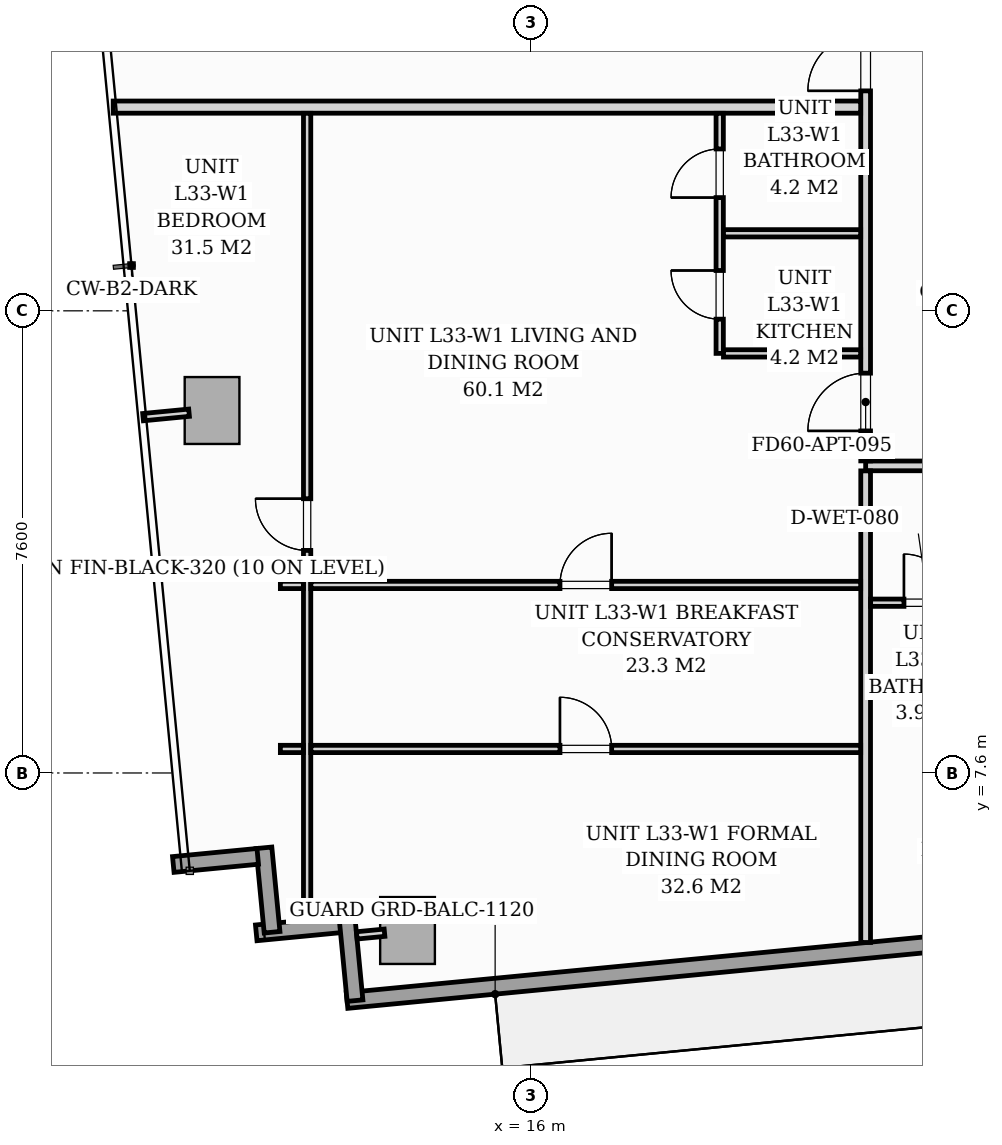
"""IFC4 building model, lengths in metres.
Left out: names, types, materials, properties, quantities, classifications, styles, units other than length and angle.
Written with IfcOpenShell. Run it as: python <this file> out.ifc"""

import sys

from ifc_helpers import new_model, si_unit, direction, frame, frame_2d, origin, origin_2d, place, context, subcontext, project, spatial, rectangle, extrude, source, transform, mapped, element, fill, save


model = new_model("IFC4")
c1 = context("Model", 3, precision=1e-05, world=origin(), true_north=direction((0.0, 1.0)))
c2 = subcontext(c1, "Body", "Model", "MODEL_VIEW")
j1 = project(units=[si_unit("LENGTHUNIT", "METRE"), si_unit("PLANEANGLEUNIT", "RADIAN")], contexts=[c1])
p1 = place(None, origin())
s1 = spatial("IfcSite", under=j1, at=p1, CompositionType="ELEMENT")
p2 = place(p1, origin())
s2 = spatial("IfcBuilding", under=s1, at=p2, CompositionType="ELEMENT")
p3 = place(p2, frame((0.0, 0.0, 116.2)))
s3 = spatial("IfcBuildingStorey", under=s2, at=p3, CompositionType="ELEMENT", Elevation=116.2)
m1 = source(origin(), c2, "Body", "SweptSolid", [
    extrude(rectangle(XDim=0.9, YDim=1.1, at=origin_2d()), origin(), (0.0, 0.0, 1.0), 3.194),
])
for number, where, z_axis, x_axis in (
    (1, (13.966, 5.01, 0.002), (0.0, 0.0, 1.0), (0.995, 0.096, 0.0)),
    (2, (10.752, 13.561, 0.002), (0.0, 0.0, 1.0), (0.995, 0.096, 0.0)),
):
    element("IfcColumn", number, at=place(p3, frame(where, z_axis=z_axis, x_axis=x_axis)), inside=s3, PredefinedType="COLUMN", context=c2, shape_type="MappedRepresentation", body=[
        mapped(m1, transform((0.0, 0.0, 0.0), scale=1.0)),
    ])
for number, where, z_axis, x_axis in (
    (3, (12.867, 5.104, 0.0), (0.0, 0.0, 1.0), (-0.995, -0.096, 0.0)),
    (4, (11.739, 4.981, 0.0), (0.0, 0.0, 1.0), (-0.096, 0.995, 0.0)),
):
    element("IfcWall", number, at=place(p3, frame(where, z_axis=z_axis, x_axis=x_axis)), inside=s3, PredefinedType="STANDARD", context=c2, shape_type="SweptSolid", body=[
        extrude(rectangle(XDim=1.395, YDim=0.26, at=frame_2d((0.697, 0.0))), origin(), (0.0, 0.0, 1.0), 2.9),
    ])
p4 = place(p3, frame((11.503, 6.229, 0.0), z_axis=(0.0, 0.0, 1.0), x_axis=(-0.995391056452, -0.09589913835, 0.0)))
e5 = element("IfcWall", 5, at=p4, inside=s3, PredefinedType="STANDARD", context=c2, shape_type="SweptSolid", body=[
    extrude(rectangle(XDim=1.395, YDim=0.26, at=frame_2d((0.698, 0.0))), origin(), (0.0, 0.0, 1.0), 2.9),
])
p5 = place(p3, frame((31.994, 5.69, 0.0), z_axis=(0.0, 0.0, 1.0), x_axis=(-0.995396521236, -0.095842399342, 0.0)))
e6 = element("IfcWall", 6, at=p5, inside=s3, PredefinedType="STANDARD", context=c2, shape_type="SweptSolid", body=[
    extrude(rectangle(XDim=19.11, YDim=0.26, at=frame_2d((9.555, 0.0))), origin(), (0.0, 0.0, 1.0), 2.9),
])
p6 = place(p5, frame((7.63, 0.0, 0.0)))
e7 = element("IfcOpeningElement", 7, at=p6, cuts=e6, PredefinedType="OPENING", context=c2, shape_type="SweptSolid", body=[
    extrude(rectangle(XDim=1.8, YDim=2.06, at=frame_2d((0.9, 1.03))), frame((0.0, 0.14, 0.0), z_axis=(0.0, -1.0, 0.0), x_axis=(1.0, 0.0, 0.0)), (0.0, 0.0, 1.0), 0.28),
])
p7 = place(p5, frame((2.5, 0.0, 0.65)))
e8 = element("IfcOpeningElement", 8, at=p7, cuts=e6, PredefinedType="OPENING", context=c2, shape_type="SweptSolid", body=[
    extrude(rectangle(XDim=1.6, YDim=1.5, at=frame_2d((0.8, 0.75))), frame((0.0, 0.14, 0.0), z_axis=(0.0, -1.0, 0.0), x_axis=(1.0, 0.0, 0.0)), (0.0, 0.0, 1.0), 0.28),
])
p8 = place(p3, frame((13.103, 3.856, 0.0), z_axis=(0.0, 0.0, 1.0), x_axis=(-0.09589913835, 0.995391056452, 0.0)))
e9 = element("IfcWall", 9, at=p8, inside=s3, PredefinedType="STANDARD", context=c2, shape_type="SweptSolid", body=[
    extrude(rectangle(XDim=1.395, YDim=0.26, at=frame_2d((0.698, 0.0))), origin(), (0.0, 0.0, 1.0), 2.9),
])
p9 = place(p3, frame((21.5, 12.65, 0.0), z_axis=(0.0, 0.0, 1.0), x_axis=(1.0, 0.0, 0.0)))
e10 = element("IfcWall", 10, at=p9, inside=s3, PredefinedType="PARTITIONING", context=c2, shape_type="SweptSolid", body=[
    extrude(rectangle(XDim=26.2, YDim=0.16, at=frame_2d((13.1, 0.0))), origin(), (0.0, 0.0, 1.0), 2.9),
])
p10 = place(p9, frame((5.927, 0.0, 0.0)))
e11 = element("IfcOpeningElement", 11, at=p10, cuts=e10, PredefinedType="OPENING", context=c2, shape_type="SweptSolid", body=[
    extrude(rectangle(XDim=0.95, YDim=2.06, at=frame_2d((0.475, 1.03))), frame((0.0, 0.09, 0.0), z_axis=(0.0, -1.0, 0.0), x_axis=(1.0, 0.0, 0.0)), (0.0, 0.0, 1.0), 0.18),
])
p11 = place(p9, frame((10.575, 0.0, 0.0)))
e12 = element("IfcOpeningElement", 12, at=p11, cuts=e10, PredefinedType="OPENING", context=c2, shape_type="SweptSolid", body=[
    extrude(rectangle(XDim=0.95, YDim=2.06, at=frame_2d((0.475, 1.03))), frame((0.0, 0.09, 0.0), z_axis=(0.0, -1.0, 0.0), x_axis=(1.0, 0.0, 0.0)), (0.0, 0.0, 1.0), 0.18),
])
p12 = place(p9, frame((19.322, 0.0, 0.0)))
e13 = element("IfcOpeningElement", 13, at=p12, cuts=e10, PredefinedType="OPENING", context=c2, shape_type="SweptSolid", body=[
    extrude(rectangle(XDim=0.95, YDim=2.06, at=frame_2d((0.475, 1.03))), frame((0.0, 0.09, 0.0), z_axis=(0.0, -1.0, 0.0), x_axis=(1.0, 0.0, 0.0)), (0.0, 0.0, 1.0), 0.18),
])
p13 = place(p3, frame((21.5, 4.812, 0.0), z_axis=(0.0, 0.0, 1.0), x_axis=(0.0, 1.0, 0.0)))
e14 = element("IfcWall", 14, at=p13, inside=s3, PredefinedType="PARTITIONING", context=c2, shape_type="SweptSolid", body=[
    extrude(rectangle(XDim=7.756, YDim=0.16, at=frame_2d((3.878, 0.0))), origin(), (0.0, 0.0, 1.0), 2.9),
])
p14 = place(p3, frame((21.5, 12.732, 0.0), z_axis=(0.0, 0.0, 1.0), x_axis=(0.0, 1.0, 0.0)))
e15 = element("IfcWall", 15, at=p14, inside=s3, PredefinedType="PARTITIONING", context=c2, shape_type="SweptSolid", body=[
    extrude(rectangle(XDim=11.647, YDim=0.16, at=frame_2d((5.823, 0.0))), origin(), (0.0, 0.0, 1.0), 2.9),
])
p15 = place(p14, frame((0.493, 0.0, 0.0)))
e16 = element("IfcOpeningElement", 16, at=p15, cuts=e15, PredefinedType="OPENING", context=c2, shape_type="SweptSolid", body=[
    extrude(rectangle(XDim=0.95, YDim=2.06, at=frame_2d((0.475, 1.03))), frame((0.0, 0.09, 0.0), z_axis=(0.0, -1.0, 0.0), x_axis=(1.0, 0.0, 0.0)), (0.0, 0.0, 1.0), 0.18),
])
p16 = place(p14, frame((6.085, 0.0, 0.0)))
e17 = element("IfcOpeningElement", 17, at=p16, cuts=e15, PredefinedType="OPENING", context=c2, shape_type="SweptSolid", body=[
    extrude(rectangle(XDim=0.95, YDim=2.06, at=frame_2d((0.475, 1.03))), frame((0.0, 0.09, 0.0), z_axis=(0.0, -1.0, 0.0), x_axis=(1.0, 0.0, 0.0)), (0.0, 0.0, 1.0), 0.18),
])
p17 = place(p3, frame((21.582, 10.4, 0.0), z_axis=(0.0, 0.0, 1.0), x_axis=(1.0, 0.0, 0.0)))
e18 = element("IfcWall", 18, at=p17, inside=s3, PredefinedType="PARTITIONING", context=c2, shape_type="SweptSolid", body=[
    extrude(rectangle(XDim=4.098, YDim=0.12, at=frame_2d((2.049, 0.0))), origin(), (0.0, 0.0, 1.0), 2.9),
])
p18 = place(p17, frame((0.548, 0.0, 0.0)))
e19 = element("IfcOpeningElement", 19, at=p18, cuts=e18, PredefinedType="OPENING", context=c2, shape_type="SweptSolid", body=[
    extrude(rectangle(XDim=0.8, YDim=2.02, at=frame_2d((0.4, 1.01))), frame((0.0, 0.07, 0.0), z_axis=(0.0, -1.0, 0.0), x_axis=(1.0, 0.0, 0.0)), (0.0, 0.0, 1.0), 0.14),
])
p19 = place(p17, frame((2.573, 0.0, 0.0)))
e20 = element("IfcOpeningElement", 20, at=p19, cuts=e18, PredefinedType="OPENING", context=c2, shape_type="SweptSolid", body=[
    extrude(rectangle(XDim=0.8, YDim=2.0, at=frame_2d((0.4, 1.0))), frame((0.0, 0.07, 0.0), z_axis=(0.0, -1.0, 0.0), x_axis=(1.0, 0.0, 0.0)), (0.0, 0.0, 1.0), 0.14),
])
p20 = place(p3, frame((9.126, 18.55, 0.0), z_axis=(0.0, 0.0, 1.0), x_axis=(1.0, 0.0, 0.0)))
e21 = element("IfcWall", 21, at=p20, inside=s3, PredefinedType="PARTITIONING", context=c2, shape_type="SweptSolid", body=[
    extrude(rectangle(XDim=12.292, YDim=0.2, at=frame_2d((6.146, 0.0))), origin(), (0.0, 0.0, 1.0), 2.9),
])
p21 = place(p3, frame((19.1, 14.5, 0.0), z_axis=(0.0, 0.0, 1.0), x_axis=(0.0, 1.0, 0.0)))
e22 = element("IfcWall", 22, at=p21, inside=s3, PredefinedType="PARTITIONING", context=c2, shape_type="SweptSolid", body=[
    extrude(rectangle(XDim=3.948, YDim=0.12, at=frame_2d((1.974, 0.0))), origin(), (0.0, 0.0, 1.0), 2.9),
])
p22 = place(p21, frame((0.563, 0.0, 0.0)))
e23 = element("IfcOpeningElement", 23, at=p22, cuts=e22, PredefinedType="OPENING", context=c2, shape_type="SweptSolid", body=[
    extrude(rectangle(XDim=0.8, YDim=2.0, at=frame_2d((0.4, 1.0))), frame((0.0, 0.07, 0.0), z_axis=(0.0, -1.0, 0.0), x_axis=(1.0, 0.0, 0.0)), (0.0, 0.0, 1.0), 0.14),
])
p23 = place(p21, frame((2.562, 0.0, 0.0)))
e24 = element("IfcOpeningElement", 24, at=p23, cuts=e22, PredefinedType="OPENING", context=c2, shape_type="SweptSolid", body=[
    extrude(rectangle(XDim=0.8, YDim=2.02, at=frame_2d((0.4, 1.01))), frame((0.0, 0.07, 0.0), z_axis=(0.0, -1.0, 0.0), x_axis=(1.0, 0.0, 0.0)), (0.0, 0.0, 1.0), 0.14),
])
for number, where, z_axis, x_axis in (
    (25, (19.162, 16.475, 0.0), (0.0, 0.0, 1.0), (1.0, 0.0, 0.0)),
    (26, (19.162, 14.5, 0.0), (0.0, 0.0, 1.0), (1.0, 0.0, 0.0)),
):
    element("IfcWall", number, at=place(p3, frame(where, z_axis=z_axis, x_axis=x_axis)), inside=s3, PredefinedType="PARTITIONING", context=c2, shape_type="SweptSolid", body=[
        extrude(rectangle(XDim=2.256, YDim=0.12, at=frame_2d((1.128, 0.0))), origin(), (0.0, 0.0, 1.0), 2.9),
    ])
p24 = place(p3, frame((12.315, 5.184, 0.0), z_axis=(0.0, 0.0, 1.0), x_axis=(0.0, 1.0, 0.0)))
e27 = element("IfcWall", 27, at=p24, inside=s3, PredefinedType="PARTITIONING", context=c2, shape_type="SweptSolid", body=[
    extrude(rectangle(XDim=13.264, YDim=0.12, at=frame_2d((6.632, 0.0))), origin(), (0.0, 0.0, 1.0), 2.9),
])
p25 = place(p24, frame((6.076, 0.0, 0.0)))
e28 = element("IfcOpeningElement", 28, at=p25, cuts=e27, PredefinedType="OPENING", context=c2, shape_type="SweptSolid", body=[
    extrude(rectangle(XDim=0.85, YDim=2.05, at=frame_2d((0.425, 1.025))), frame((0.0, 0.07, 0.0), z_axis=(0.0, -1.0, 0.0), x_axis=(1.0, 0.0, 0.0)), (0.0, 0.0, 1.0), 0.14),
])
p26 = place(p3, frame((11.875, 7.995, 0.0), z_axis=(0.0, 0.0, 1.0), x_axis=(1.0, 0.0, 0.0)))
e29 = element("IfcWall", 29, at=p26, inside=s3, PredefinedType="PARTITIONING", context=c2, shape_type="SweptSolid", body=[
    extrude(rectangle(XDim=0.378, YDim=0.12, at=frame_2d((0.189, 0.0))), origin(), (0.0, 0.0, 1.0), 2.9),
])
p27 = place(p3, frame((12.377, 7.995, 0.0), z_axis=(0.0, 0.0, 1.0), x_axis=(1.0, 0.0, 0.0)))
e30 = element("IfcWall", 30, at=p27, inside=s3, PredefinedType="PARTITIONING", context=c2, shape_type="SweptSolid", body=[
    extrude(rectangle(XDim=9.041, YDim=0.12, at=frame_2d((4.521, 0.0))), origin(), (0.0, 0.0, 1.0), 2.9),
])
p28 = place(p27, frame((4.096, 0.0, 0.0)))
e31 = element("IfcOpeningElement", 31, at=p28, cuts=e30, PredefinedType="OPENING", context=c2, shape_type="SweptSolid", body=[
    extrude(rectangle(XDim=0.85, YDim=2.05, at=frame_2d((0.425, 1.025))), frame((0.0, 0.07, 0.0), z_axis=(0.0, -1.0, 0.0), x_axis=(1.0, 0.0, 0.0)), (0.0, 0.0, 1.0), 0.14),
])
p29 = place(p3, frame((11.875, 10.692, 0.0), z_axis=(0.0, 0.0, 1.0), x_axis=(1.0, 0.0, 0.0)))
e32 = element("IfcWall", 32, at=p29, inside=s3, PredefinedType="PARTITIONING", context=c2, shape_type="SweptSolid", body=[
    extrude(rectangle(XDim=0.378, YDim=0.12, at=frame_2d((0.189, 0.0))), origin(), (0.0, 0.0, 1.0), 2.9),
])
p30 = place(p3, frame((12.377, 10.692, 0.0), z_axis=(0.0, 0.0, 1.0), x_axis=(1.0, 0.0, 0.0)))
e33 = element("IfcWall", 33, at=p30, inside=s3, PredefinedType="PARTITIONING", context=c2, shape_type="SweptSolid", body=[
    extrude(rectangle(XDim=9.041, YDim=0.12, at=frame_2d((4.521, 0.0))), origin(), (0.0, 0.0, 1.0), 2.9),
])
p31 = place(p30, frame((4.096, 0.0, 0.0)))
e34 = element("IfcOpeningElement", 34, at=p31, cuts=e33, PredefinedType="OPENING", context=c2, shape_type="SweptSolid", body=[
    extrude(rectangle(XDim=0.85, YDim=2.05, at=frame_2d((0.425, 1.025))), frame((0.0, 0.07, 0.0), z_axis=(0.0, -1.0, 0.0), x_axis=(1.0, 0.0, 0.0)), (0.0, 0.0, 1.0), 0.14),
])
p32 = place(p3, frame((13.588, 4.973, 0.0), z_axis=(0.0, 0.0, 1.0), x_axis=(-0.995435366701, -0.095438098896, 0.0)))
e35 = element("IfcWall", 35, at=p32, inside=s3, PredefinedType="PARTITIONING", context=c2, shape_type="SweptSolid", body=[
    extrude(rectangle(XDim=0.458, YDim=0.12, at=frame_2d((0.229, 0.0))), origin(), (0.0, 0.0, 1.0), 2.9),
])
p33 = place(p3, frame((10.373, 13.524, 0.0), z_axis=(0.0, 0.0, 1.0), x_axis=(-0.995377786728, -0.096036772582, 0.0)))
e36 = element("IfcWall", 36, at=p33, inside=s3, PredefinedType="PARTITIONING", context=c2, shape_type="SweptSolid", body=[
    extrude(rectangle(XDim=0.76, YDim=0.12, at=frame_2d((0.38, 0.0))), origin(), (0.0, 0.0, 1.0), 2.9),
])
m2 = source(origin(), c2, "Body", "SweptSolid", [
    extrude(rectangle(XDim=0.8, YDim=2.02, at=frame_2d((0.4, 1.01))), frame((0.0, 0.025, 0.0), z_axis=(0.0, -1.0, 0.0), x_axis=(1.0, 0.0, 0.0)), (0.0, 0.0, 1.0), 0.05),
])
p34 = place(p18, origin())
e37 = element("IfcDoor", 37, at=p34, inside=s3, OperationType="SINGLE_SWING_LEFT", PredefinedType="DOOR", context=c2, shape_type="MappedRepresentation", body=[
    mapped(m2, transform((0.0, 0.0, 0.0), scale=1.0)),
])
fill(e19, e37)
m3 = source(origin(), c2, "Body", "SweptSolid", [
    extrude(rectangle(XDim=0.95, YDim=2.06, at=frame_2d((0.475, 1.03))), frame((0.0, 0.025, 0.0), z_axis=(0.0, -1.0, 0.0), x_axis=(1.0, 0.0, 0.0)), (0.0, 0.0, 1.0), 0.05),
])
p35 = place(p15, origin())
e38 = element("IfcDoor", 38, at=p35, inside=s3, OperationType="SINGLE_SWING_LEFT", PredefinedType="DOOR", context=c2, shape_type="MappedRepresentation", body=[
    mapped(m3, transform((0.0, 0.0, 0.0), scale=1.0)),
])
fill(e16, e38)
m4 = source(origin(), c2, "Body", "SweptSolid", [
    extrude(rectangle(XDim=0.8, YDim=2.0, at=frame_2d((0.4, 1.0))), frame((0.0, 0.025, 0.0), z_axis=(0.0, -1.0, 0.0), x_axis=(1.0, 0.0, 0.0)), (0.0, 0.0, 1.0), 0.05),
])
p36 = place(p22, origin())
e39 = element("IfcDoor", 39, at=p36, inside=s3, OperationType="SINGLE_SWING_RIGHT", PredefinedType="DOOR", context=c2, shape_type="MappedRepresentation", body=[
    mapped(m4, transform((0.0, 0.0, 0.0), scale=1.0)),
])
fill(e23, e39)
p37 = place(p23, origin())
e40 = element("IfcDoor", 40, at=p37, inside=s3, OperationType="SINGLE_SWING_LEFT", PredefinedType="DOOR", context=c2, shape_type="MappedRepresentation", body=[
    mapped(m2, transform((0.0, 0.0, 0.0), scale=1.0)),
])
fill(e24, e40)
m5 = source(origin(), c2, "Body", "SweptSolid", [
    extrude(rectangle(XDim=0.85, YDim=2.05, at=frame_2d((0.425, 1.025))), frame((0.0, 0.025, 0.0), z_axis=(0.0, -1.0, 0.0), x_axis=(1.0, 0.0, 0.0)), (0.0, 0.0, 1.0), 0.05),
])
p38 = place(p25, origin())
e41 = element("IfcDoor", 41, at=p38, inside=s3, OperationType="SINGLE_SWING_RIGHT", PredefinedType="DOOR", context=c2, shape_type="MappedRepresentation", body=[
    mapped(m5, transform((0.0, 0.0, 0.0), scale=1.0)),
])
fill(e28, e41)
p39 = place(p28, origin())
e42 = element("IfcDoor", 42, at=p39, inside=s3, OperationType="SINGLE_SWING_LEFT", PredefinedType="DOOR", context=c2, shape_type="MappedRepresentation", body=[
    mapped(m5, transform((0.0, 0.0, 0.0), scale=1.0)),
])
fill(e31, e42)
p40 = place(p31, origin())
e43 = element("IfcDoor", 43, at=p40, inside=s3, OperationType="SINGLE_SWING_RIGHT", PredefinedType="DOOR", context=c2, shape_type="MappedRepresentation", body=[
    mapped(m5, transform((0.0, 0.0, 0.0), scale=1.0)),
])
fill(e34, e43)
p41 = place(p16, origin())
e44 = element("IfcDoor", 44, at=p41, inside=s3, OperationType="SINGLE_SWING_LEFT", PredefinedType="DOOR", context=c2, shape_type="MappedRepresentation", body=[
    mapped(m3, transform((0.0, 0.0, 0.0), scale=1.0)),
])
fill(e17, e44)
save(model, sys.argv[1])
